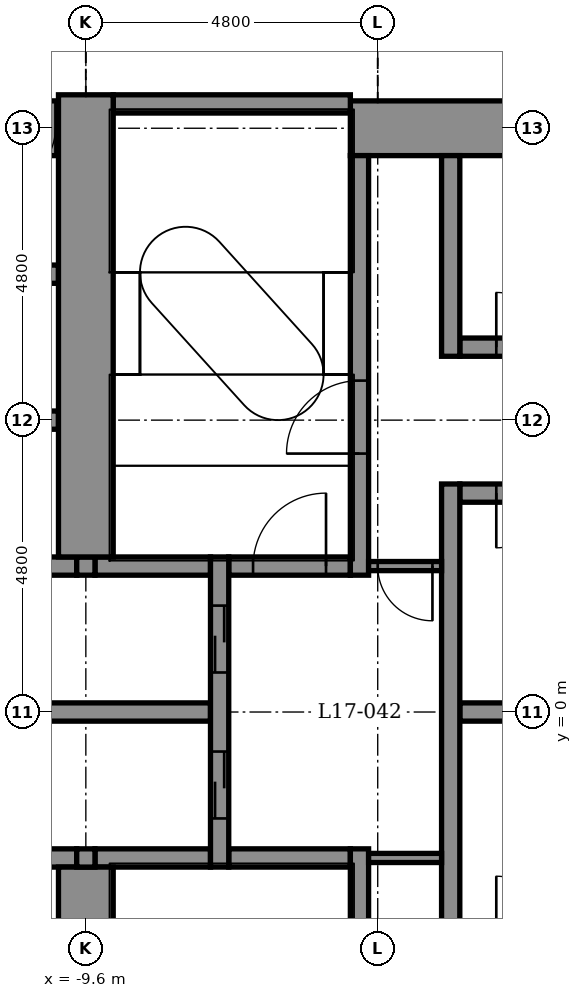
"""IFC4 building model, lengths in metres.
Left out: names, types, materials, properties, quantities, classifications, styles, units other than length and angle.
Written with IfcOpenShell. Run it as: python <this file> out.ifc"""

import sys

from ifc_helpers import new_model, si_unit, direction, frame, frame_2d, origin, place, context, subcontext, project, spatial, rectangle, extrude, element, fill, save


model = new_model("IFC4")
c1 = context("Model", 3, precision=1e-05, world=origin(), true_north=direction((0.0, 1.0)))
c2 = subcontext(c1, "Body", "Model", "MODEL_VIEW")
j1 = project(units=[si_unit("LENGTHUNIT", "METRE"), si_unit("PLANEANGLEUNIT", "RADIAN")], contexts=[c1])
p1 = place(None, origin())
s1 = spatial("IfcSite", under=j1, at=p1, CompositionType="ELEMENT")
p2 = place(p1, origin())
s2 = spatial("IfcBuilding", under=s1, at=p2, CompositionType="ELEMENT")
p3 = place(p2, frame((0.0, 0.0, 91.4)))
s3 = spatial("IfcBuildingStorey", under=s2, at=p3, CompositionType="ELEMENT", Elevation=91.4)
p4 = place(p3, frame((-10.85, -2.4, -0.2), z_axis=(0.0, 0.0, 1.0), x_axis=(1.0, 0.0, 0.0)))
e1 = element("IfcWall", 1, at=p4, inside=s3, PredefinedType="STANDARD", context=c2, shape_type="SweptSolid", body=[
    extrude(rectangle(XDim=1.1, YDim=0.3, at=frame_2d((0.55, 0.0))), origin(), (0.0, 0.0, 1.0), 4.5),
])
p5 = place(p3, frame((-9.45, -2.4, -0.2), z_axis=(0.0, 0.0, 1.0), x_axis=(1.0, 0.0, 0.0)))
e2 = element("IfcWall", 2, at=p5, inside=s3, PredefinedType="STANDARD", context=c2, shape_type="SweptSolid", body=[
    extrude(rectangle(XDim=1.9, YDim=0.3, at=frame_2d((0.95, 0.0))), origin(), (0.0, 0.0, 1.0), 4.5),
])
p6 = place(p3, frame((-7.25, -2.4, -0.2), z_axis=(0.0, 0.0, 1.0), x_axis=(1.0, 0.0, 0.0)))
e3 = element("IfcWall", 3, at=p6, inside=s3, PredefinedType="STANDARD", context=c2, shape_type="SweptSolid", body=[
    extrude(rectangle(XDim=2.0, YDim=0.3, at=frame_2d((1.0, 0.0))), origin(), (0.0, 0.0, 1.0), 4.5),
])
p7 = place(p3, frame((-10.85, 0.0, -0.2), z_axis=(0.0, 0.0, 1.0), x_axis=(1.0, 0.0, 0.0)))
e4 = element("IfcWall", 4, at=p7, inside=s3, PredefinedType="STANDARD", context=c2, shape_type="SweptSolid", body=[
    extrude(rectangle(XDim=3.3, YDim=0.3, at=frame_2d((1.65, 0.0))), origin(), (0.0, 0.0, 1.0), 4.5),
])
p8 = place(p3, frame((-3.45, 0.0, -0.2), z_axis=(0.0, 0.0, 1.0), x_axis=(1.0, 0.0, 0.0)))
e5 = element("IfcWall", 5, at=p8, inside=s3, PredefinedType="STANDARD", context=c2, shape_type="SweptSolid", body=[
    extrude(rectangle(XDim=2.1, YDim=0.3, at=frame_2d((1.05, 0.0))), origin(), (0.0, 0.0, 1.0), 4.5),
])
p9 = place(p3, frame((-10.85, 2.4, -0.2), z_axis=(0.0, 0.0, 1.0), x_axis=(1.0, 0.0, 0.0)))
e6 = element("IfcWall", 6, at=p9, inside=s3, PredefinedType="STANDARD", context=c2, shape_type="SweptSolid", body=[
    extrude(rectangle(XDim=1.1, YDim=0.3, at=frame_2d((0.55, 0.0))), origin(), (0.0, 0.0, 1.0), 4.5),
])
p10 = place(p3, frame((-9.45, 2.4, -0.2), z_axis=(0.0, 0.0, 1.0), x_axis=(1.0, 0.0, 0.0)))
e7 = element("IfcWall", 7, at=p10, inside=s3, PredefinedType="STANDARD", context=c2, shape_type="SweptSolid", body=[
    extrude(rectangle(XDim=1.9, YDim=0.3, at=frame_2d((0.95, 0.0))), origin(), (0.0, 0.0, 1.0), 4.5),
])
p11 = place(p3, frame((-7.25, 2.4, -0.2), z_axis=(0.0, 0.0, 1.0), x_axis=(1.0, 0.0, 0.0)))
e8 = element("IfcWall", 8, at=p11, inside=s3, PredefinedType="STANDARD", context=c2, shape_type="SweptSolid", body=[
    extrude(rectangle(XDim=2.0, YDim=0.3, at=frame_2d((1.0, 0.0))), origin(), (0.0, 0.0, 1.0), 4.5),
])
p12 = place(p11, frame((0.4, 0.0, 0.2)))
e9 = element("IfcOpeningElement", 9, at=p12, cuts=e8, PredefinedType="OPENING", context=c2, shape_type="SweptSolid", body=[
    extrude(rectangle(XDim=1.2, YDim=2.1, at=frame_2d((0.6, 1.05))), frame((0.0, 0.16, 0.0), z_axis=(0.0, -1.0, 0.0), x_axis=(1.0, 0.0, 0.0)), (0.0, 0.0, 1.0), 0.32),
])
p13 = place(p3, frame((-3.45, 3.6, -0.2), z_axis=(0.0, 0.0, 1.0), x_axis=(1.0, 0.0, 0.0)))
e10 = element("IfcWall", 10, at=p13, inside=s3, PredefinedType="STANDARD", context=c2, shape_type="SweptSolid", body=[
    extrude(rectangle(XDim=2.1, YDim=0.3, at=frame_2d((1.05, 0.0))), origin(), (0.0, 0.0, 1.0), 4.5),
])
p14 = place(p13, frame((0.6, 0.0, 0.2)))
e11 = element("IfcOpeningElement", 11, at=p14, cuts=e10, PredefinedType="OPENING", context=c2, shape_type="SweptSolid", body=[
    extrude(rectangle(XDim=0.9, YDim=2.1, at=frame_2d((0.45, 1.05))), frame((0.0, 0.16, 0.0), z_axis=(0.0, -1.0, 0.0), x_axis=(1.0, 0.0, 0.0)), (0.0, 0.0, 1.0), 0.32),
])
p15 = place(p3, frame((-13.95, 4.8, -0.2), z_axis=(0.0, 0.0, 1.0), x_axis=(1.0, 0.0, 0.0)))
e12 = element("IfcWall", 12, at=p15, inside=s3, PredefinedType="STANDARD", context=c2, shape_type="SweptSolid", body=[
    extrude(rectangle(XDim=3.9, YDim=0.3, at=frame_2d((1.95, 0.0))), origin(), (0.0, 0.0, 1.0), 4.5),
])
p16 = place(p3, frame((-3.45, 6.0, -0.2), z_axis=(0.0, 0.0, 1.0), x_axis=(1.0, 0.0, 0.0)))
e13 = element("IfcWall", 13, at=p16, inside=s3, PredefinedType="STANDARD", context=c2, shape_type="SweptSolid", body=[
    extrude(rectangle(XDim=2.1, YDim=0.3, at=frame_2d((1.05, 0.0))), origin(), (0.0, 0.0, 1.0), 4.5),
])
p17 = place(p16, frame((0.6, 0.0, 0.2)))
e14 = element("IfcOpeningElement", 14, at=p17, cuts=e13, PredefinedType="OPENING", context=c2, shape_type="SweptSolid", body=[
    extrude(rectangle(XDim=0.9, YDim=2.1, at=frame_2d((0.45, 1.05))), frame((0.0, 0.16, 0.0), z_axis=(0.0, -1.0, 0.0), x_axis=(1.0, 0.0, 0.0)), (0.0, 0.0, 1.0), 0.32),
])
p18 = place(p3, frame((-13.95, 7.2, -0.2), z_axis=(0.0, 0.0, 1.0), x_axis=(1.0, 0.0, 0.0)))
e15 = element("IfcWall", 15, at=p18, inside=s3, PredefinedType="STANDARD", context=c2, shape_type="SweptSolid", body=[
    extrude(rectangle(XDim=3.9, YDim=0.3, at=frame_2d((1.95, 0.0))), origin(), (0.0, 0.0, 1.0), 4.5),
])
p19 = place(p3, frame((-13.95, 9.6, -0.2), z_axis=(0.0, 0.0, 1.0), x_axis=(1.0, 0.0, 0.0)))
e16 = element("IfcWall", 16, at=p19, inside=s3, PredefinedType="SHEAR", context=c2, shape_type="SweptSolid", body=[
    extrude(rectangle(XDim=3.9, YDim=0.9, at=frame_2d((1.95, 0.0))), origin(), (0.0, 0.0, 1.0), 4.5),
])
p20 = place(p19, frame((0.05, 0.0, 0.2)))
e17 = element("IfcOpeningElement", 17, at=p20, cuts=e16, PredefinedType="OPENING", context=c2, shape_type="SweptSolid", body=[
    extrude(rectangle(XDim=0.9, YDim=2.1, at=frame_2d((0.45, 1.05))), frame((0.0, 0.46, 0.0), z_axis=(0.0, -1.0, 0.0), x_axis=(1.0, 0.0, 0.0)), (0.0, 0.0, 1.0), 0.92),
])
p21 = place(p19, frame((1.5, 0.0, 0.2)))
e18 = element("IfcOpeningElement", 18, at=p21, cuts=e16, PredefinedType="OPENING", context=c2, shape_type="SweptSolid", body=[
    extrude(rectangle(XDim=0.9, YDim=2.1, at=frame_2d((0.45, 1.05))), frame((0.0, 0.46, 0.0), z_axis=(0.0, -1.0, 0.0), x_axis=(1.0, 0.0, 0.0)), (0.0, 0.0, 1.0), 0.92),
])
p22 = place(p19, frame((2.95, 0.0, 0.2)))
e19 = element("IfcOpeningElement", 19, at=p22, cuts=e16, PredefinedType="OPENING", context=c2, shape_type="SweptSolid", body=[
    extrude(rectangle(XDim=0.9, YDim=2.1, at=frame_2d((0.45, 1.05))), frame((0.0, 0.46, 0.0), z_axis=(0.0, -1.0, 0.0), x_axis=(1.0, 0.0, 0.0)), (0.0, 0.0, 1.0), 0.92),
])
p23 = place(p3, frame((-5.25, 9.6, -0.2), z_axis=(0.0, 0.0, 1.0), x_axis=(1.0, 0.0, 0.0)))
e20 = element("IfcWall", 20, at=p23, inside=s3, PredefinedType="SHEAR", context=c2, shape_type="SweptSolid", body=[
    extrude(rectangle(XDim=14.4, YDim=0.9, at=frame_2d((7.2, 0.0))), origin(), (0.0, 0.0, 1.0), 4.5),
])
p24 = place(p23, frame((9.35, 0.0, 0.2)))
e21 = element("IfcOpeningElement", 21, at=p24, cuts=e20, PredefinedType="OPENING", context=c2, shape_type="SweptSolid", body=[
    extrude(rectangle(XDim=1.4, YDim=2.1, at=frame_2d((0.7, 1.05))), frame((0.0, 0.46, 0.0), z_axis=(0.0, -1.0, 0.0), x_axis=(1.0, 0.0, 0.0)), (0.0, 0.0, 1.0), 0.92),
])
p25 = place(p3, frame((-9.15, 10.0, -0.2), z_axis=(0.0, 0.0, 1.0), x_axis=(1.0, 0.0, 0.0)))
e22 = element("IfcWall", 22, at=p25, inside=s3, PredefinedType="STANDARD", context=c2, shape_type="SweptSolid", body=[
    extrude(rectangle(XDim=3.9, YDim=0.3, at=frame_2d((1.95, 0.0))), origin(), (0.0, 0.0, 1.0), 4.5),
])
p26 = place(p3, frame((-9.6, -10.15, -0.2), z_axis=(0.0, 0.0, 1.0), x_axis=(0.0, 1.0, 0.0)))
e23 = element("IfcWall", 23, at=p26, inside=s3, PredefinedType="SHEAR", context=c2, shape_type="SweptSolid", body=[
    extrude(rectangle(XDim=7.6, YDim=0.9, at=frame_2d((3.8, 0.0))), origin(), (0.0, 0.0, 1.0), 4.5),
])
for number, where, z_axis, x_axis in (
    (24, (-9.6, -2.55, -0.2), (0.0, 0.0, 1.0), (0.0, 1.0, 0.0)),
    (25, (-9.6, 2.25, -0.2), (0.0, 0.0, 1.0), (0.0, 1.0, 0.0)),
):
    element("IfcWall", number, at=place(p3, frame(where, z_axis=z_axis, x_axis=x_axis)), inside=s3, PredefinedType="STANDARD", context=c2, shape_type="SweptSolid", body=[
        extrude(rectangle(XDim=0.3, YDim=0.3, at=frame_2d((0.15, 0.0))), origin(), (0.0, 0.0, 1.0), 4.5),
    ])
p27 = place(p3, frame((-9.6, 2.55, -0.2), z_axis=(0.0, 0.0, 1.0), x_axis=(0.0, 1.0, 0.0)))
e26 = element("IfcWall", 26, at=p27, inside=s3, PredefinedType="SHEAR", context=c2, shape_type="SweptSolid", body=[
    extrude(rectangle(XDim=7.6, YDim=0.9, at=frame_2d((3.8, 0.0))), origin(), (0.0, 0.0, 1.0), 4.5),
])
p28 = place(p3, frame((-7.4, -2.55, -0.2), z_axis=(0.0, 0.0, 1.0), x_axis=(0.0, 1.0, 0.0)))
e27 = element("IfcWall", 27, at=p28, inside=s3, PredefinedType="STANDARD", context=c2, shape_type="SweptSolid", body=[
    extrude(rectangle(XDim=5.1, YDim=0.3, at=frame_2d((2.55, 0.0))), origin(), (0.0, 0.0, 1.0), 4.5),
])
p29 = place(p28, frame((0.8, 0.0, 0.2)))
e28 = element("IfcOpeningElement", 28, at=p29, cuts=e27, PredefinedType="OPENING", context=c2, shape_type="SweptSolid", body=[
    extrude(rectangle(XDim=1.1, YDim=2.1, at=frame_2d((0.55, 1.05))), frame((0.0, 0.16, 0.0), z_axis=(0.0, -1.0, 0.0), x_axis=(1.0, 0.0, 0.0)), (0.0, 0.0, 1.0), 0.32),
])
p30 = place(p28, frame((3.2, 0.0, 0.2)))
e29 = element("IfcOpeningElement", 29, at=p30, cuts=e27, PredefinedType="OPENING", context=c2, shape_type="SweptSolid", body=[
    extrude(rectangle(XDim=1.1, YDim=2.1, at=frame_2d((0.55, 1.05))), frame((0.0, 0.16, 0.0), z_axis=(0.0, -1.0, 0.0), x_axis=(1.0, 0.0, 0.0)), (0.0, 0.0, 1.0), 0.32),
])
p31 = place(p3, frame((-5.1, -9.15, -0.2), z_axis=(0.0, 0.0, 1.0), x_axis=(0.0, 1.0, 0.0)))
e30 = element("IfcWall", 30, at=p31, inside=s3, PredefinedType="STANDARD", context=c2, shape_type="SweptSolid", body=[
    extrude(rectangle(XDim=6.9, YDim=0.3, at=frame_2d((3.45, 0.0))), origin(), (0.0, 0.0, 1.0), 4.5),
])
p32 = place(p31, frame((3.7, 0.0, 0.2)))
e31 = element("IfcOpeningElement", 31, at=p32, cuts=e30, PredefinedType="OPENING", context=c2, shape_type="SweptSolid", body=[
    extrude(rectangle(XDim=1.2, YDim=2.1, at=frame_2d((0.6, 1.05))), frame((0.0, 0.16, 0.0), z_axis=(0.0, -1.0, 0.0), x_axis=(1.0, 0.0, 0.0)), (0.0, 0.0, 1.0), 0.32),
])
p33 = place(p3, frame((-5.1, 2.25, -0.2), z_axis=(0.0, 0.0, 1.0), x_axis=(0.0, 1.0, 0.0)))
e32 = element("IfcWall", 32, at=p33, inside=s3, PredefinedType="STANDARD", context=c2, shape_type="SweptSolid", body=[
    extrude(rectangle(XDim=6.9, YDim=0.3, at=frame_2d((3.45, 0.0))), origin(), (0.0, 0.0, 1.0), 4.5),
])
p34 = place(p33, frame((2.0, 0.0, 0.2)))
e33 = element("IfcOpeningElement", 33, at=p34, cuts=e32, PredefinedType="OPENING", context=c2, shape_type="SweptSolid", body=[
    extrude(rectangle(XDim=1.2, YDim=2.1, at=frame_2d((0.6, 1.05))), frame((0.0, 0.16, 0.0), z_axis=(0.0, -1.0, 0.0), x_axis=(1.0, 0.0, 0.0)), (0.0, 0.0, 1.0), 0.32),
])
p35 = place(p3, frame((-3.6, -3.75, -0.2), z_axis=(0.0, 0.0, 1.0), x_axis=(0.0, 1.0, 0.0)))
e34 = element("IfcWall", 34, at=p35, inside=s3, PredefinedType="STANDARD", context=c2, shape_type="SweptSolid", body=[
    extrude(rectangle(XDim=7.5, YDim=0.3, at=frame_2d((3.75, 0.0))), origin(), (0.0, 0.0, 1.0), 4.5),
])
p36 = place(p3, frame((-3.6, 5.85, -0.2), z_axis=(0.0, 0.0, 1.0), x_axis=(0.0, 1.0, 0.0)))
e35 = element("IfcWall", 35, at=p36, inside=s3, PredefinedType="STANDARD", context=c2, shape_type="SweptSolid", body=[
    extrude(rectangle(XDim=3.3, YDim=0.3, at=frame_2d((1.65, 0.0))), origin(), (0.0, 0.0, 1.0), 4.5),
])
p37 = place(p3, frame((-4.95, 2.4, 0.0), z_axis=(0.0, 0.0, 1.0), x_axis=(1.0, 0.0, 0.0)))
e36 = element("IfcWall", 36, at=p37, inside=s3, PredefinedType="PARTITIONING", context=c2, shape_type="SweptSolid", body=[
    extrude(rectangle(XDim=1.2, YDim=0.15, at=frame_2d((0.6, 0.0))), origin(), (0.0, 0.0, 1.0), 4.3),
])
p38 = place(p37, frame((0.15, 0.0, 0.0)))
e37 = element("IfcOpeningElement", 37, at=p38, cuts=e36, PredefinedType="OPENING", context=c2, shape_type="SweptSolid", body=[
    extrude(rectangle(XDim=0.9, YDim=2.1, at=frame_2d((0.45, 1.05))), frame((0.0, 0.085, 0.0), z_axis=(0.0, -1.0, 0.0), x_axis=(1.0, 0.0, 0.0)), (0.0, 0.0, 1.0), 0.17),
])
p39 = place(p3, frame((-4.95, -2.4, 0.0), z_axis=(0.0, 0.0, 1.0), x_axis=(1.0, 0.0, 0.0)))
e38 = element("IfcWall", 38, at=p39, inside=s3, PredefinedType="PARTITIONING", context=c2, shape_type="SweptSolid", body=[
    extrude(rectangle(XDim=1.2, YDim=0.15, at=frame_2d((0.6, 0.0))), origin(), (0.0, 0.0, 1.0), 4.3),
])
p40 = place(p29, origin())
e39 = element("IfcDoor", 39, at=p40, inside=s3, OperationType="DOUBLE_DOOR_SLIDING", PredefinedType="DOOR", context=c2, shape_type="SweptSolid", body=[
    extrude(rectangle(XDim=1.1, YDim=2.1, at=frame_2d((0.55, 1.05))), frame((0.0, 0.025, 0.0), z_axis=(0.0, -1.0, 0.0), x_axis=(1.0, 0.0, 0.0)), (0.0, 0.0, 1.0), 0.05),
])
fill(e28, e39)
p41 = place(p30, origin())
e40 = element("IfcDoor", 40, at=p41, inside=s3, OperationType="DOUBLE_DOOR_SLIDING", PredefinedType="DOOR", context=c2, shape_type="SweptSolid", body=[
    extrude(rectangle(XDim=1.1, YDim=2.1, at=frame_2d((0.55, 1.05))), frame((0.0, 0.025, 0.0), z_axis=(0.0, -1.0, 0.0), x_axis=(1.0, 0.0, 0.0)), (0.0, 0.0, 1.0), 0.05),
])
fill(e29, e40)
p42 = place(p34, origin())
e41 = element("IfcDoor", 41, at=p42, inside=s3, OperationType="SINGLE_SWING_LEFT", PredefinedType="DOOR", context=c2, shape_type="SweptSolid", body=[
    extrude(rectangle(XDim=1.2, YDim=2.1, at=frame_2d((0.6, 1.05))), frame((0.0, 0.025, 0.0), z_axis=(0.0, -1.0, 0.0), x_axis=(1.0, 0.0, 0.0)), (0.0, 0.0, 1.0), 0.05),
])
fill(e33, e41)
p43 = place(p17, origin())
e42 = element("IfcDoor", 42, at=p43, inside=s3, OperationType="SINGLE_SWING_LEFT", PredefinedType="DOOR", context=c2, shape_type="SweptSolid", body=[
    extrude(rectangle(XDim=0.9, YDim=2.1, at=frame_2d((0.45, 1.05))), frame((0.0, 0.025, 0.0), z_axis=(0.0, -1.0, 0.0), x_axis=(1.0, 0.0, 0.0)), (0.0, 0.0, 1.0), 0.05),
])
fill(e14, e42)
p44 = place(p14, frame((0.9, 0.0, 0.0), z_axis=(0.0, 0.0, 1.0), x_axis=(-1.0, 0.0, 0.0)))
e43 = element("IfcDoor", 43, at=p44, inside=s3, OperationType="SINGLE_SWING_LEFT", PredefinedType="DOOR", context=c2, shape_type="SweptSolid", body=[
    extrude(rectangle(XDim=0.9, YDim=2.1, at=frame_2d((0.45, 1.05))), frame((0.0, 0.025, 0.0), z_axis=(0.0, -1.0, 0.0), x_axis=(1.0, 0.0, 0.0)), (0.0, 0.0, 1.0), 0.05),
])
fill(e11, e43)
p45 = place(p22, frame((0.9, 0.0, 0.0), z_axis=(0.0, 0.0, 1.0), x_axis=(-1.0, 0.0, 0.0)))
e44 = element("IfcDoor", 44, at=p45, inside=s3, OperationType="SINGLE_SWING_LEFT", PredefinedType="DOOR", context=c2, shape_type="SweptSolid", body=[
    extrude(rectangle(XDim=0.9, YDim=2.1, at=frame_2d((0.45, 1.05))), frame((0.0, 0.025, 0.0), z_axis=(0.0, -1.0, 0.0), x_axis=(1.0, 0.0, 0.0)), (0.0, 0.0, 1.0), 0.05),
])
fill(e19, e44)
p46 = place(p38, frame((0.9, 0.0, 0.0), z_axis=(0.0, 0.0, 1.0), x_axis=(-1.0, 0.0, 0.0)))
e45 = element("IfcDoor", 45, at=p46, inside=s3, OperationType="SINGLE_SWING_RIGHT", PredefinedType="DOOR", context=c2, shape_type="SweptSolid", body=[
    extrude(rectangle(XDim=0.9, YDim=2.1, at=frame_2d((0.45, 1.05))), frame((0.0, 0.025, 0.0), z_axis=(0.0, -1.0, 0.0), x_axis=(1.0, 0.0, 0.0)), (0.0, 0.0, 1.0), 0.05),
])
fill(e37, e45)
p47 = place(p12, origin())
e46 = element("IfcDoor", 46, at=p47, inside=s3, OperationType="SINGLE_SWING_RIGHT", PredefinedType="DOOR", context=c2, shape_type="SweptSolid", body=[
    extrude(rectangle(XDim=1.2, YDim=2.1, at=frame_2d((0.6, 1.05))), frame((0.0, 0.025, 0.0), z_axis=(0.0, -1.0, 0.0), x_axis=(1.0, 0.0, 0.0)), (0.0, 0.0, 1.0), 0.05),
])
fill(e9, e46)
save(model, sys.argv[1])
